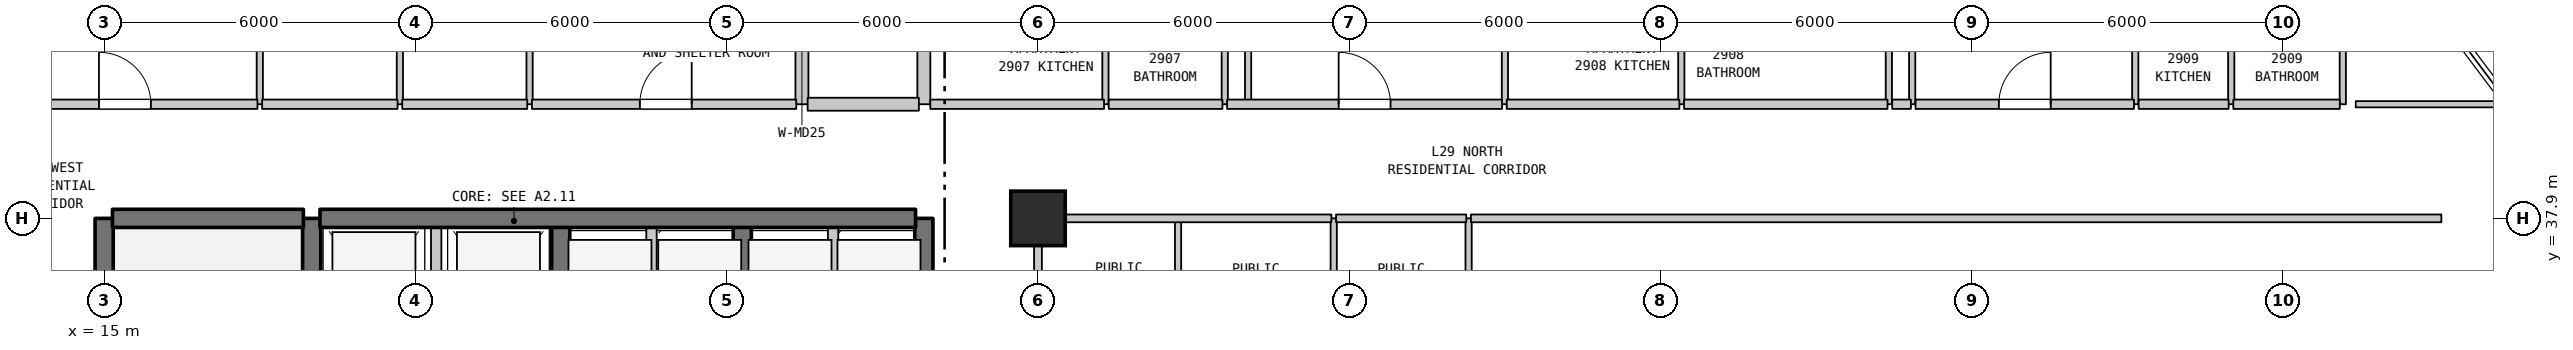
"""IFC4 building model, lengths in metres.
Left out: names, types, materials, properties, quantities, classifications, styles, units other than length and angle.
Written with IfcOpenShell. Run it as: python <this file> out.ifc"""

import sys

from ifc_helpers import new_model, si_unit, direction, frame, frame_2d, origin, origin_2d, place, context, subcontext, project, spatial, rectangle, extrude, element, fill, save


model = new_model("IFC4")
c1 = context("Model", 3, precision=1e-05, world=origin(), true_north=direction((0.0, 1.0)))
c2 = subcontext(c1, "Body", "Model", "MODEL_VIEW")
j1 = project(units=[si_unit("LENGTHUNIT", "METRE"), si_unit("PLANEANGLEUNIT", "RADIAN")], contexts=[c1])
p1 = place(None, origin())
s1 = spatial("IfcSite", under=j1, at=p1, CompositionType="ELEMENT")
p2 = place(p1, origin())
s2 = spatial("IfcBuilding", under=s1, at=p2, CompositionType="ELEMENT")
p3 = place(p2, frame((0.0, 0.0, 120.5)))
s3 = spatial("IfcBuildingStorey", under=s2, at=p3, CompositionType="ELEMENT", Elevation=120.5)
p4 = place(p3, frame((33.0, 37.9, 0.0), z_axis=(0.0, 0.0, 1.0), x_axis=(1.0, 0.0, 0.0)))
e1 = element("IfcColumn", 1, at=p4, inside=s3, PredefinedType="COLUMN", context=c2, shape_type="SweptSolid", body=[
    extrude(rectangle(XDim=1.05, YDim=1.05, at=origin_2d()), origin(), (0.0, 0.0, 1.0), 4.8),
])
p5 = place(p3, frame((15.0, 31.1, 0.0), z_axis=(0.0, 0.0, 1.0), x_axis=(0.0, 1.0, 0.0)))
e2 = element("IfcWall", 2, at=p5, inside=s3, PredefinedType="SHEAR", context=c2, shape_type="SweptSolid", body=[
    extrude(rectangle(XDim=6.8, YDim=0.35, at=frame_2d((3.4, 0.0))), origin(), (0.0, 0.0, 1.0), 4.48),
])
p6 = place(p3, frame((18.0, 40.1, 0.0), z_axis=(0.0, 0.0, 1.0), x_axis=(0.0, 1.0, 0.0)))
e3 = element("IfcWall", 3, at=p6, inside=s3, PredefinedType="PARTITIONING", context=c2, shape_type="SweptSolid", body=[
    extrude(rectangle(XDim=3.2, YDim=0.12, at=frame_2d((1.6, 0.0))), origin(), (0.0, 0.0, 1.0), 4.48),
])
p7 = place(p3, frame((19.0, 35.0, 0.0), z_axis=(0.0, 0.0, 1.0), x_axis=(0.0, 1.0, 0.0)))
e4 = element("IfcWall", 4, at=p7, inside=s3, PredefinedType="SHEAR", context=c2, shape_type="SweptSolid", body=[
    extrude(rectangle(XDim=2.9, YDim=0.35, at=frame_2d((1.45, 0.0))), origin(), (0.0, 0.0, 1.0), 4.48),
])
p8 = place(p3, frame((20.7, 40.1, 0.0), z_axis=(0.0, 0.0, 1.0), x_axis=(0.0, 1.0, 0.0)))
e5 = element("IfcWall", 5, at=p8, inside=s3, PredefinedType="PARTITIONING", context=c2, shape_type="SweptSolid", body=[
    extrude(rectangle(XDim=3.2, YDim=0.12, at=frame_2d((1.6, 0.0))), origin(), (0.0, 0.0, 1.0), 4.48),
])
p9 = place(p8, frame((1.15, 0.0, 0.0)))
e6 = element("IfcOpeningElement", 6, at=p9, cuts=e5, PredefinedType="OPENING", context=c2, shape_type="SweptSolid", body=[
    extrude(rectangle(XDim=0.9, YDim=2.15, at=frame_2d((0.45, 1.075))), frame((0.0, 0.07, 0.0), z_axis=(0.0, -1.0, 0.0), x_axis=(1.0, 0.0, 0.0)), (0.0, 0.0, 1.0), 0.14),
])
p10 = place(p3, frame((21.4, 35.0, 0.0), z_axis=(0.0, 0.0, 1.0), x_axis=(0.0, 1.0, 0.0)))
e7 = element("IfcWall", 7, at=p10, inside=s3, PredefinedType="STANDARD", context=c2, shape_type="SweptSolid", body=[
    extrude(rectangle(XDim=2.9, YDim=0.2, at=frame_2d((1.45, 0.0))), origin(), (0.0, 0.0, 1.0), 4.48),
])
p11 = place(p3, frame((23.2, 40.1, 0.0), z_axis=(0.0, 0.0, 1.0), x_axis=(0.0, 1.0, 0.0)))
e8 = element("IfcWall", 8, at=p11, inside=s3, PredefinedType="PARTITIONING", context=c2, shape_type="SweptSolid", body=[
    extrude(rectangle(XDim=2.05, YDim=0.12, at=frame_2d((1.025, 0.0))), origin(), (0.0, 0.0, 1.0), 4.48),
])
p12 = place(p3, frame((23.8, 35.0, 0.0), z_axis=(0.0, 0.0, 1.0), x_axis=(0.0, 1.0, 0.0)))
e9 = element("IfcWall", 9, at=p12, inside=s3, PredefinedType="SHEAR", context=c2, shape_type="SweptSolid", body=[
    extrude(rectangle(XDim=2.9, YDim=0.35, at=frame_2d((1.45, 0.0))), origin(), (0.0, 0.0, 1.0), 4.48),
])
p13 = place(p3, frame((25.55, 35.0, 0.0), z_axis=(0.0, 0.0, 1.0), x_axis=(0.0, 1.0, 0.0)))
e10 = element("IfcWall", 10, at=p13, inside=s3, PredefinedType="STANDARD", context=c2, shape_type="SweptSolid", body=[
    extrude(rectangle(XDim=2.9, YDim=0.2, at=frame_2d((1.45, 0.0))), origin(), (0.0, 0.0, 1.0), 4.48),
])
p14 = place(p3, frame((27.3, 35.0, 0.0), z_axis=(0.0, 0.0, 1.0), x_axis=(0.0, 1.0, 0.0)))
e11 = element("IfcWall", 11, at=p14, inside=s3, PredefinedType="SHEAR", context=c2, shape_type="SweptSolid", body=[
    extrude(rectangle(XDim=2.9, YDim=0.35, at=frame_2d((1.45, 0.0))), origin(), (0.0, 0.0, 1.0), 4.48),
])
p15 = place(p3, frame((28.45, 40.1, 0.0), z_axis=(0.0, 0.0, 1.0), x_axis=(0.0, 1.0, 0.0)))
e12 = element("IfcWall", 12, at=p15, inside=s3, PredefinedType="STANDARD", context=c2, shape_type="SweptSolid", body=[
    extrude(rectangle(XDim=2.3, YDim=0.25, at=frame_2d((1.15, 0.0))), origin(), (0.0, 0.0, 1.0), 4.48),
])
p16 = place(p3, frame((29.05, 35.0, 0.0), z_axis=(0.0, 0.0, 1.0), x_axis=(0.0, 1.0, 0.0)))
e13 = element("IfcWall", 13, at=p16, inside=s3, PredefinedType="STANDARD", context=c2, shape_type="SweptSolid", body=[
    extrude(rectangle(XDim=2.9, YDim=0.2, at=frame_2d((1.45, 0.0))), origin(), (0.0, 0.0, 1.0), 4.48),
])
p17 = place(p3, frame((30.8, 35.0, 0.0), z_axis=(0.0, 0.0, 1.0), x_axis=(0.0, 1.0, 0.0)))
e14 = element("IfcWall", 14, at=p17, inside=s3, PredefinedType="SHEAR", context=c2, shape_type="SweptSolid", body=[
    extrude(rectangle(XDim=2.9, YDim=0.35, at=frame_2d((1.45, 0.0))), origin(), (0.0, 0.0, 1.0), 4.48),
])
p18 = place(p3, frame((30.8, 40.1, 0.0), z_axis=(0.0, 0.0, 1.0), x_axis=(0.0, 1.0, 0.0)))
e15 = element("IfcWall", 15, at=p18, inside=s3, PredefinedType="STANDARD", context=c2, shape_type="SweptSolid", body=[
    extrude(rectangle(XDim=2.3, YDim=0.25, at=frame_2d((1.15, 0.0))), origin(), (0.0, 0.0, 1.0), 4.48),
])
p19 = place(p3, frame((33.0, 35.0, 0.0), z_axis=(0.0, 0.0, 1.0), x_axis=(0.0, 1.0, 0.0)))
e16 = element("IfcWall", 16, at=p19, inside=s3, PredefinedType="STANDARD", context=c2, shape_type="SweptSolid", body=[
    extrude(rectangle(XDim=2.9, YDim=0.15, at=frame_2d((1.45, 0.0))), origin(), (0.0, 0.0, 1.0), 3.98),
])
p20 = place(p3, frame((34.3, 40.1, 0.0), z_axis=(0.0, 0.0, 1.0), x_axis=(0.0, 1.0, 0.0)))
e17 = element("IfcWall", 17, at=p20, inside=s3, PredefinedType="PARTITIONING", context=c2, shape_type="SweptSolid", body=[
    extrude(rectangle(XDim=2.3, YDim=0.12, at=frame_2d((1.15, 0.0))), origin(), (0.0, 0.0, 1.0), 4.48),
])
p21 = place(p3, frame((35.7, 35.0, 0.0), z_axis=(0.0, 0.0, 1.0), x_axis=(0.0, 1.0, 0.0)))
e18 = element("IfcWall", 18, at=p21, inside=s3, PredefinedType="PARTITIONING", context=c2, shape_type="SweptSolid", body=[
    extrude(rectangle(XDim=2.9, YDim=0.12, at=frame_2d((1.45, 0.0))), origin(), (0.0, 0.0, 1.0), 4.48),
])
p22 = place(p3, frame((36.6, 40.1, 0.0), z_axis=(0.0, 0.0, 1.0), x_axis=(0.0, 1.0, 0.0)))
e19 = element("IfcWall", 19, at=p22, inside=s3, PredefinedType="PARTITIONING", context=c2, shape_type="SweptSolid", body=[
    extrude(rectangle(XDim=2.3, YDim=0.12, at=frame_2d((1.15, 0.0))), origin(), (0.0, 0.0, 1.0), 4.48),
])
p23 = place(p3, frame((37.05, 40.1, 0.0), z_axis=(0.0, 0.0, 1.0), x_axis=(0.0, 1.0, 0.0)))
e20 = element("IfcWall", 20, at=p23, inside=s3, PredefinedType="PARTITIONING", context=c2, shape_type="SweptSolid", body=[
    extrude(rectangle(XDim=2.05, YDim=0.12, at=frame_2d((1.025, 0.0))), origin(), (0.0, 0.0, 1.0), 4.48),
])
for number, where, z_axis, x_axis in (
    (21, (38.7, 35.0, 0.0), (0.0, 0.0, 1.0), (0.0, 1.0, 0.0)),
    (22, (41.3, 35.0, 0.0), (0.0, 0.0, 1.0), (0.0, 1.0, 0.0)),
):
    element("IfcWall", number, at=place(p3, frame(where, z_axis=z_axis, x_axis=x_axis)), inside=s3, PredefinedType="PARTITIONING", context=c2, shape_type="SweptSolid", body=[
        extrude(rectangle(XDim=2.9, YDim=0.12, at=frame_2d((1.45, 0.0))), origin(), (0.0, 0.0, 1.0), 4.48),
    ])
for number, where, z_axis, x_axis in (
    (23, (42.0, 40.1, 0.0), (0.0, 0.0, 1.0), (0.0, 1.0, 0.0)),
    (24, (45.4, 40.1, 0.0), (0.0, 0.0, 1.0), (0.0, 1.0, 0.0)),
    (25, (49.4, 40.1, 0.0), (0.0, 0.0, 1.0), (0.0, 1.0, 0.0)),
):
    element("IfcWall", number, at=place(p3, frame(where, z_axis=z_axis, x_axis=x_axis)), inside=s3, PredefinedType="PARTITIONING", context=c2, shape_type="SweptSolid", body=[
        extrude(rectangle(XDim=2.3, YDim=0.12, at=frame_2d((1.15, 0.0))), origin(), (0.0, 0.0, 1.0), 4.48),
    ])
p24 = place(p3, frame((49.85, 40.1, 0.0), z_axis=(0.0, 0.0, 1.0), x_axis=(0.0, 1.0, 0.0)))
e26 = element("IfcWall", 26, at=p24, inside=s3, PredefinedType="PARTITIONING", context=c2, shape_type="SweptSolid", body=[
    extrude(rectangle(XDim=5.35, YDim=0.12, at=frame_2d((2.675, 0.0))), origin(), (0.0, 0.0, 1.0), 4.48),
])
for number, where, z_axis, x_axis in (
    (27, (54.15, 40.1, 0.0), (0.0, 0.0, 1.0), (0.0, 1.0, 0.0)),
    (28, (56.0, 40.1, 0.0), (0.0, 0.0, 1.0), (0.0, 1.0, 0.0)),
    (29, (58.15, 40.1, 0.0), (0.0, 0.0, 1.0), (0.0, 1.0, 0.0)),
):
    element("IfcWall", number, at=place(p3, frame(where, z_axis=z_axis, x_axis=x_axis)), inside=s3, PredefinedType="PARTITIONING", context=c2, shape_type="SweptSolid", body=[
        extrude(rectangle(XDim=2.3, YDim=0.12, at=frame_2d((1.15, 0.0))), origin(), (0.0, 0.0, 1.0), 4.48),
    ])
p25 = place(p3, frame((15.16, 37.9, 0.0), z_axis=(0.0, 0.0, 1.0), x_axis=(1.0, 0.0, 0.0)))
e30 = element("IfcWall", 30, at=p25, inside=s3, PredefinedType="SHEAR", context=c2, shape_type="SweptSolid", body=[
    extrude(rectangle(XDim=3.68, YDim=0.35, at=frame_2d((1.84, 0.0))), origin(), (0.0, 0.0, 1.0), 4.48),
])
p26 = place(p3, frame((19.16, 37.9, 0.0), z_axis=(0.0, 0.0, 1.0), x_axis=(1.0, 0.0, 0.0)))
e31 = element("IfcWall", 31, at=p26, inside=s3, PredefinedType="SHEAR", context=c2, shape_type="SweptSolid", body=[
    extrude(rectangle(XDim=11.48, YDim=0.35, at=frame_2d((5.74, 0.0))), origin(), (0.0, 0.0, 1.0), 4.48),
])
p27 = place(p3, frame((33.06, 37.9, 0.0), z_axis=(0.0, 0.0, 1.0), x_axis=(1.0, 0.0, 0.0)))
e32 = element("IfcWall", 32, at=p27, inside=s3, PredefinedType="STANDARD", context=c2, shape_type="SweptSolid", body=[
    extrude(rectangle(XDim=5.595, YDim=0.15, at=frame_2d((2.797, 0.0))), origin(), (0.0, 0.0, 1.0), 4.48),
])
p28 = place(p3, frame((38.745, 37.9, 0.0), z_axis=(0.0, 0.0, 1.0), x_axis=(1.0, 0.0, 0.0)))
e33 = element("IfcWall", 33, at=p28, inside=s3, PredefinedType="STANDARD", context=c2, shape_type="SweptSolid", body=[
    extrude(rectangle(XDim=2.51, YDim=0.15, at=frame_2d((1.255, 0.0))), origin(), (0.0, 0.0, 1.0), 4.48),
])
p29 = place(p3, frame((41.345, 37.9, 0.0), z_axis=(0.0, 0.0, 1.0), x_axis=(1.0, 0.0, 0.0)))
e34 = element("IfcWall", 34, at=p29, inside=s3, PredefinedType="STANDARD", context=c2, shape_type="SweptSolid", body=[
    extrude(rectangle(XDim=18.705, YDim=0.15, at=frame_2d((9.353, 0.0))), origin(), (0.0, 0.0, 1.0), 4.48),
])
p30 = place(p3, frame((12.875, 40.1, 0.0), z_axis=(0.0, 0.0, 1.0), x_axis=(1.0, 0.0, 0.0)))
e35 = element("IfcWall", 35, at=p30, inside=s3, PredefinedType="STANDARD", context=c2, shape_type="SweptSolid", body=[
    extrude(rectangle(XDim=5.08, YDim=0.18, at=frame_2d((2.54, 0.0))), origin(), (0.0, 0.0, 1.0), 4.48),
])
p31 = place(p30, frame((2.025, 0.0, 0.0)))
e36 = element("IfcOpeningElement", 36, at=p31, cuts=e35, PredefinedType="OPENING", context=c2, shape_type="SweptSolid", body=[
    extrude(rectangle(XDim=1.0, YDim=2.15, at=frame_2d((0.5, 1.075))), frame((0.0, 0.1, 0.0), z_axis=(0.0, -1.0, 0.0), x_axis=(1.0, 0.0, 0.0)), (0.0, 0.0, 1.0), 0.2),
])
p32 = place(p3, frame((18.045, 40.1, 0.0), z_axis=(0.0, 0.0, 1.0), x_axis=(1.0, 0.0, 0.0)))
e37 = element("IfcWall", 37, at=p32, inside=s3, PredefinedType="STANDARD", context=c2, shape_type="SweptSolid", body=[
    extrude(rectangle(XDim=2.61, YDim=0.18, at=frame_2d((1.305, 0.0))), origin(), (0.0, 0.0, 1.0), 4.48),
])
p33 = place(p3, frame((20.745, 40.1, 0.0), z_axis=(0.0, 0.0, 1.0), x_axis=(1.0, 0.0, 0.0)))
e38 = element("IfcWall", 38, at=p33, inside=s3, PredefinedType="STANDARD", context=c2, shape_type="SweptSolid", body=[
    extrude(rectangle(XDim=2.41, YDim=0.18, at=frame_2d((1.205, 0.0))), origin(), (0.0, 0.0, 1.0), 4.48),
])
p34 = place(p3, frame((23.245, 40.1, 0.0), z_axis=(0.0, 0.0, 1.0), x_axis=(1.0, 0.0, 0.0)))
e39 = element("IfcWall", 39, at=p34, inside=s3, PredefinedType="STANDARD", context=c2, shape_type="SweptSolid", body=[
    extrude(rectangle(XDim=5.095, YDim=0.18, at=frame_2d((2.547, 0.0))), origin(), (0.0, 0.0, 1.0), 4.48),
])
p35 = place(p34, frame((2.08, 0.0, 0.0)))
e40 = element("IfcOpeningElement", 40, at=p35, cuts=e39, PredefinedType="OPENING", context=c2, shape_type="SweptSolid", body=[
    extrude(rectangle(XDim=1.0, YDim=2.15, at=frame_2d((0.5, 1.075))), frame((0.0, 0.1, 0.0), z_axis=(0.0, -1.0, 0.0), x_axis=(1.0, 0.0, 0.0)), (0.0, 0.0, 1.0), 0.2),
])
p36 = place(p3, frame((28.56, 40.1, 0.0), z_axis=(0.0, 0.0, 1.0), x_axis=(1.0, 0.0, 0.0)))
e41 = element("IfcWall", 41, at=p36, inside=s3, PredefinedType="STANDARD", context=c2, shape_type="SweptSolid", body=[
    extrude(rectangle(XDim=2.144, YDim=0.25, at=frame_2d((1.072, 0.0))), origin(), (0.0, 0.0, 1.0), 4.48),
])
p37 = place(p3, frame((30.924, 40.1, 0.0), z_axis=(0.0, 0.0, 1.0), x_axis=(1.0, 0.0, 0.0)))
e42 = element("IfcWall", 42, at=p37, inside=s3, PredefinedType="STANDARD", context=c2, shape_type="SweptSolid", body=[
    extrude(rectangle(XDim=3.349, YDim=0.18, at=frame_2d((1.674, 0.0))), origin(), (0.0, 0.0, 1.0), 4.48),
])
p38 = place(p3, frame((34.363, 40.1, 0.0), z_axis=(0.0, 0.0, 1.0), x_axis=(1.0, 0.0, 0.0)))
e43 = element("IfcWall", 43, at=p38, inside=s3, PredefinedType="STANDARD", context=c2, shape_type="SweptSolid", body=[
    extrude(rectangle(XDim=2.192, YDim=0.18, at=frame_2d((1.096, 0.0))), origin(), (0.0, 0.0, 1.0), 4.48),
])
p39 = place(p3, frame((36.645, 40.1, 0.0), z_axis=(0.0, 0.0, 1.0), x_axis=(1.0, 0.0, 0.0)))
e44 = element("IfcWall", 44, at=p39, inside=s3, PredefinedType="STANDARD", context=c2, shape_type="SweptSolid", body=[
    extrude(rectangle(XDim=5.3, YDim=0.18, at=frame_2d((2.65, 0.0))), origin(), (0.0, 0.0, 1.0), 4.48),
])
p40 = place(p39, frame((2.15, 0.0, 0.0)))
e45 = element("IfcOpeningElement", 45, at=p40, cuts=e44, PredefinedType="OPENING", context=c2, shape_type="SweptSolid", body=[
    extrude(rectangle(XDim=1.0, YDim=2.15, at=frame_2d((0.5, 1.075))), frame((0.0, 0.1, 0.0), z_axis=(0.0, -1.0, 0.0), x_axis=(1.0, 0.0, 0.0)), (0.0, 0.0, 1.0), 0.2),
])
p41 = place(p3, frame((42.035, 40.1, 0.0), z_axis=(0.0, 0.0, 1.0), x_axis=(1.0, 0.0, 0.0)))
e46 = element("IfcWall", 46, at=p41, inside=s3, PredefinedType="STANDARD", context=c2, shape_type="SweptSolid", body=[
    extrude(rectangle(XDim=3.328, YDim=0.18, at=frame_2d((1.664, 0.0))), origin(), (0.0, 0.0, 1.0), 4.48),
])
p42 = place(p3, frame((45.453, 40.1, 0.0), z_axis=(0.0, 0.0, 1.0), x_axis=(1.0, 0.0, 0.0)))
e47 = element("IfcWall", 47, at=p42, inside=s3, PredefinedType="STANDARD", context=c2, shape_type="SweptSolid", body=[
    extrude(rectangle(XDim=3.922, YDim=0.18, at=frame_2d((1.961, 0.0))), origin(), (0.0, 0.0, 1.0), 4.48),
])
p43 = place(p3, frame((49.465, 40.1, 0.0), z_axis=(0.0, 0.0, 1.0), x_axis=(1.0, 0.0, 0.0)))
e48 = element("IfcWall", 48, at=p43, inside=s3, PredefinedType="STANDARD", context=c2, shape_type="SweptSolid", body=[
    extrude(rectangle(XDim=0.36, YDim=0.18, at=frame_2d((0.18, 0.0))), origin(), (0.0, 0.0, 1.0), 4.48),
])
p44 = place(p3, frame((49.915, 40.1, 0.0), z_axis=(0.0, 0.0, 1.0), x_axis=(1.0, 0.0, 0.0)))
e49 = element("IfcWall", 49, at=p44, inside=s3, PredefinedType="STANDARD", context=c2, shape_type="SweptSolid", body=[
    extrude(rectangle(XDim=4.21, YDim=0.18, at=frame_2d((2.105, 0.0))), origin(), (0.0, 0.0, 1.0), 4.48),
])
p45 = place(p44, frame((1.605, 0.0, 0.0)))
e50 = element("IfcOpeningElement", 50, at=p45, cuts=e49, PredefinedType="OPENING", context=c2, shape_type="SweptSolid", body=[
    extrude(rectangle(XDim=1.0, YDim=2.15, at=frame_2d((0.5, 1.075))), frame((0.0, 0.1, 0.0), z_axis=(0.0, -1.0, 0.0), x_axis=(1.0, 0.0, 0.0)), (0.0, 0.0, 1.0), 0.2),
])
p46 = place(p3, frame((54.215, 40.1, 0.0), z_axis=(0.0, 0.0, 1.0), x_axis=(1.0, 0.0, 0.0)))
e51 = element("IfcWall", 51, at=p46, inside=s3, PredefinedType="STANDARD", context=c2, shape_type="SweptSolid", body=[
    extrude(rectangle(XDim=1.735, YDim=0.18, at=frame_2d((0.867, 0.0))), origin(), (0.0, 0.0, 1.0), 4.48),
])
p47 = place(p3, frame((56.04, 40.1, 0.0), z_axis=(0.0, 0.0, 1.0), x_axis=(1.0, 0.0, 0.0)))
e52 = element("IfcWall", 52, at=p47, inside=s3, PredefinedType="STANDARD", context=c2, shape_type="SweptSolid", body=[
    extrude(rectangle(XDim=2.053, YDim=0.18, at=frame_2d((1.026, 0.0))), origin(), (0.0, 0.0, 1.0), 4.48),
])
p48 = place(p3, frame((58.4, 40.1, 0.0), z_axis=(0.0, 0.0, 1.0), x_axis=(1.0, 0.0, 0.0)))
e53 = element("IfcWall", 53, at=p48, inside=s3, PredefinedType="PARTITIONING", context=c2, shape_type="SweptSolid", body=[
    extrude(rectangle(XDim=2.94, YDim=0.12, at=frame_2d((1.47, 0.0))), origin(), (0.0, 0.0, 1.0), 4.48),
])
p49 = place(p31, origin())
e54 = element("IfcDoor", 54, at=p49, inside=s3, OperationType="SINGLE_SWING_LEFT", PredefinedType="DOOR", context=c2, shape_type="SweptSolid", body=[
    extrude(rectangle(XDim=1.0, YDim=2.15, at=frame_2d((0.5, 1.075))), frame((0.0, 0.025, 0.0), z_axis=(0.0, -1.0, 0.0), x_axis=(1.0, 0.0, 0.0)), (0.0, 0.0, 1.0), 0.05),
])
fill(e36, e54)
p50 = place(p35, origin())
e55 = element("IfcDoor", 55, at=p50, inside=s3, OperationType="SINGLE_SWING_RIGHT", PredefinedType="DOOR", context=c2, shape_type="SweptSolid", body=[
    extrude(rectangle(XDim=1.0, YDim=2.15, at=frame_2d((0.5, 1.075))), frame((0.0, 0.025, 0.0), z_axis=(0.0, -1.0, 0.0), x_axis=(1.0, 0.0, 0.0)), (0.0, 0.0, 1.0), 0.05),
])
fill(e40, e55)
p51 = place(p40, origin())
e56 = element("IfcDoor", 56, at=p51, inside=s3, OperationType="SINGLE_SWING_LEFT", PredefinedType="DOOR", context=c2, shape_type="SweptSolid", body=[
    extrude(rectangle(XDim=1.0, YDim=2.15, at=frame_2d((0.5, 1.075))), frame((0.0, 0.025, 0.0), z_axis=(0.0, -1.0, 0.0), x_axis=(1.0, 0.0, 0.0)), (0.0, 0.0, 1.0), 0.05),
])
fill(e45, e56)
p52 = place(p45, origin())
e57 = element("IfcDoor", 57, at=p52, inside=s3, OperationType="SINGLE_SWING_RIGHT", PredefinedType="DOOR", context=c2, shape_type="SweptSolid", body=[
    extrude(rectangle(XDim=1.0, YDim=2.15, at=frame_2d((0.5, 1.075))), frame((0.0, 0.025, 0.0), z_axis=(0.0, -1.0, 0.0), x_axis=(1.0, 0.0, 0.0)), (0.0, 0.0, 1.0), 0.05),
])
fill(e50, e57)
save(model, sys.argv[1])
